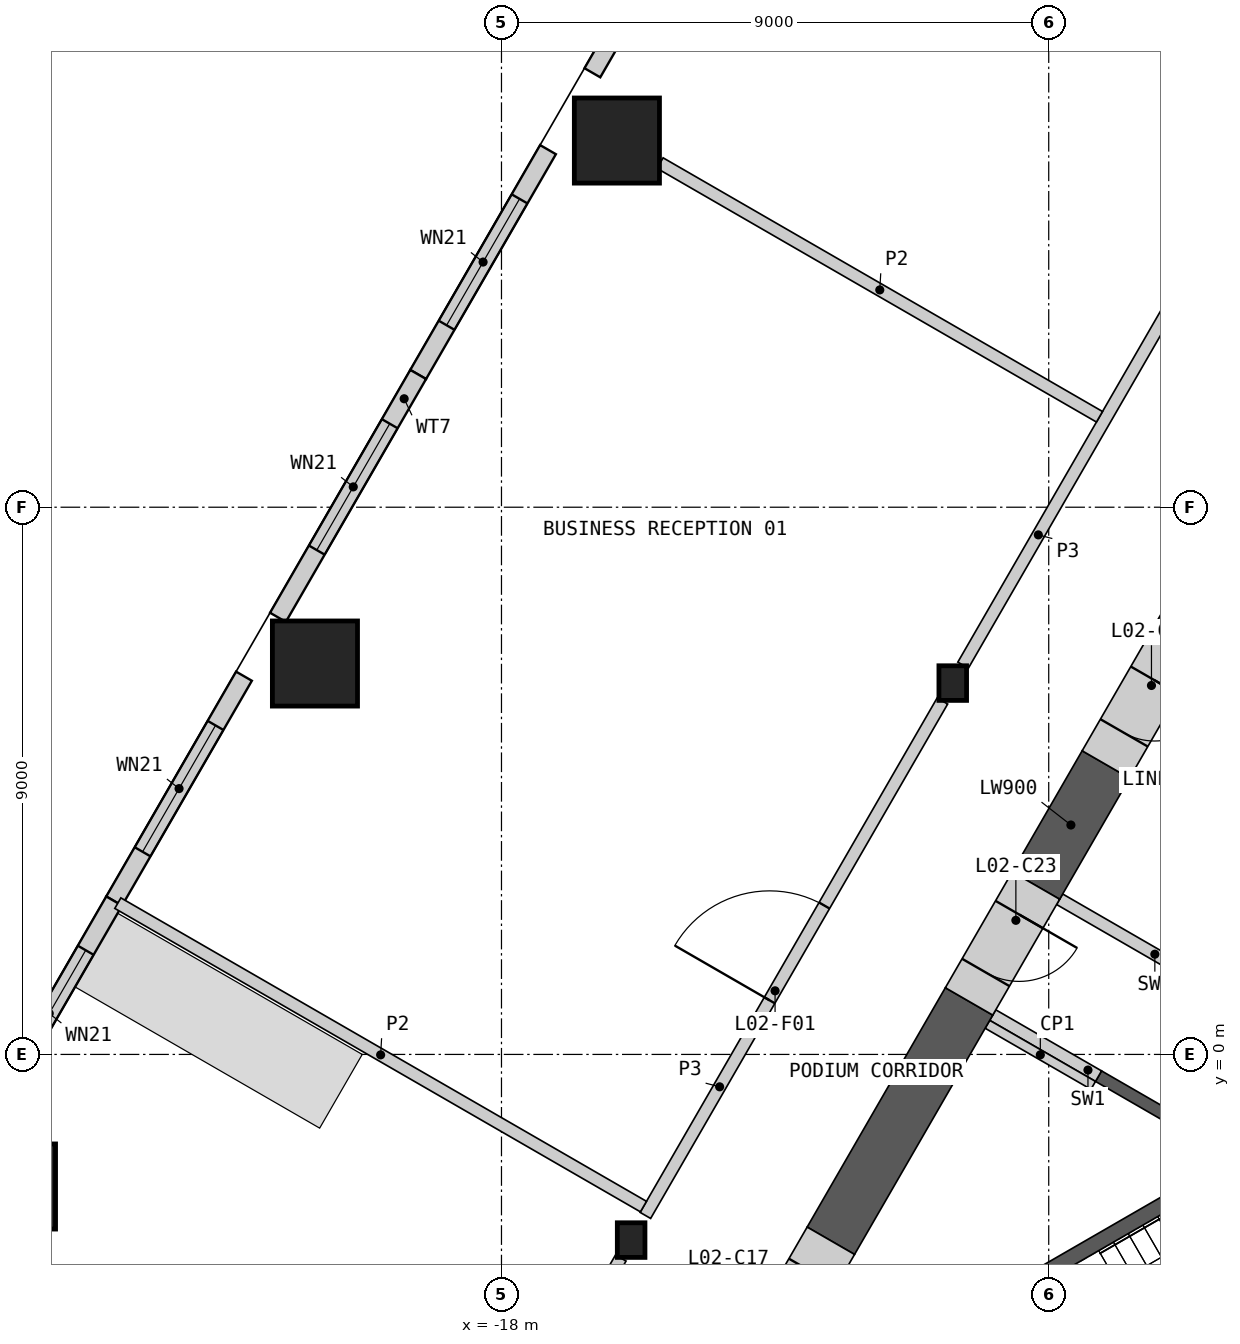
"""IFC4 building model, lengths in metres.
Left out: names, types, materials, properties, quantities, classifications, styles, units other than length and angle.
Written with IfcOpenShell. Run it as: python <this file> out.ifc"""

import sys

from ifc_helpers import new_model, si_unit, direction, frame, frame_2d, origin, origin_2d, place, context, subcontext, project, spatial, polyline, rectangle, hollow_rectangle, i_section, outline, extrude, element, fill, save


model = new_model("IFC4")
c1 = context("Model", 3, precision=1e-05, world=origin(), true_north=direction((0.0, 1.0)))
c2 = subcontext(c1, "Body", "Model", "MODEL_VIEW")
j1 = project(units=[si_unit("LENGTHUNIT", "METRE"), si_unit("PLANEANGLEUNIT", "RADIAN")], contexts=[c1])
p1 = place(None, origin())
s1 = spatial("IfcSite", under=j1, at=p1, CompositionType="ELEMENT")
p2 = place(p1, origin())
s2 = spatial("IfcBuilding", under=s1, at=p2, CompositionType="ELEMENT")
p3 = place(p2, frame((0.0, 0.0, 15.5)))
s3 = spatial("IfcBuildingStorey", under=s2, at=p3, CompositionType="ELEMENT", Elevation=15.5)
for number, where, z_axis, x_axis in (
    (1, (-16.102, 15.031, 0.0), (0.0, 0.0, 1.0), (1.0, 0.0, 0.0)),
    (2, (-21.068, 6.429, 0.0), (0.0, 0.0, 1.0), (1.0, 0.0, 0.0)),
    (3, (-26.034, -2.172, 0.0), (0.0, 0.0, 1.0), (1.0, 0.0, 0.0)),
):
    element("IfcColumn", number, at=place(p3, frame(where, z_axis=z_axis, x_axis=x_axis)), inside=s3, PredefinedType="COLUMN", context=c2, shape_type="SweptSolid", body=[
        extrude(hollow_rectangle(XDim=1.4, YDim=1.4, WallThickness=0.1, at=origin_2d()), origin(), (0.0, 0.0, 1.0), 5.5),
    ])
for number, where, z_axis, x_axis in (
    (4, (-10.578, 6.107, 0.0), (0.0, 0.0, 1.0), (1.0, 0.0, 0.0)),
    (5, (-15.868, -3.054, 0.0), (0.0, 0.0, 1.0), (1.0, 0.0, 0.0)),
):
    element("IfcColumn", number, at=place(p3, frame(where, z_axis=z_axis, x_axis=x_axis)), inside=s3, PredefinedType="COLUMN", context=c2, shape_type="SweptSolid", body=[
        extrude(i_section(OverallWidth=0.454, OverallDepth=0.57, WebThickness=0.078, FlangeThickness=0.125, at=origin_2d()), origin(), (0.0, 0.0, 1.0), 5.5),
    ])
p4 = place(p3, frame((-14.37, 19.844, 0.0), z_axis=(0.0, 0.0, 1.0), x_axis=(-0.500019418418, -0.866014192265, 0.0)))
e6 = element("IfcWall", 6, at=p4, inside=s3, PredefinedType="SOLIDWALL", context=c2, shape_type="SweptSolid", body=[
    extrude(rectangle(XDim=4.27, YDim=0.3, at=frame_2d((2.135, 0.0))), origin(), (0.0, 0.0, 1.0), 5.05),
])
p5 = place(p4, frame((0.935, 0.0, 0.9)))
e7 = element("IfcOpeningElement", 7, at=p5, cuts=e6, PredefinedType="OPENING", context=c2, shape_type="SweptSolid", body=[
    extrude(rectangle(XDim=2.4, YDim=3.0, at=frame_2d((1.2, 1.5))), frame((0.0, 0.16, 0.0), z_axis=(0.0, -1.0, 0.0), x_axis=(1.0, 0.0, 0.0)), (0.0, 0.0, 1.0), 0.32),
])
p6 = place(p3, frame((-17.235, 14.881, 0.0), z_axis=(0.0, 0.0, 1.0), x_axis=(-0.499994660107, -0.866028486751, 0.0)))
e8 = element("IfcWall", 8, at=p6, inside=s3, PredefinedType="SOLIDWALL", context=c2, shape_type="SweptSolid", body=[
    extrude(rectangle(XDim=4.27, YDim=0.3, at=frame_2d((2.135, 0.0))), origin(), (0.0, 0.0, 1.0), 5.05),
])
p7 = place(p6, frame((0.935, 0.0, 0.9)))
e9 = element("IfcOpeningElement", 9, at=p7, cuts=e8, PredefinedType="OPENING", context=c2, shape_type="SweptSolid", body=[
    extrude(rectangle(XDim=2.4, YDim=3.0, at=frame_2d((1.2, 1.5))), frame((0.0, 0.16, 0.0), z_axis=(0.0, -1.0, 0.0), x_axis=(1.0, 0.0, 0.0)), (0.0, 0.0, 1.0), 0.32),
])
p8 = place(p3, frame((-19.37, 11.183, 0.0), z_axis=(0.0, 0.0, 1.0), x_axis=(-0.499982117899, -0.866035727774, 0.0)))
e10 = element("IfcWall", 10, at=p8, inside=s3, PredefinedType="SOLIDWALL", context=c2, shape_type="SweptSolid", body=[
    extrude(rectangle(XDim=4.612, YDim=0.3, at=frame_2d((2.306, 0.0))), origin(), (0.0, 0.0, 1.0), 5.05),
])
p9 = place(p8, frame((0.935, 0.0, 0.9)))
e11 = element("IfcOpeningElement", 11, at=p9, cuts=e10, PredefinedType="OPENING", context=c2, shape_type="SweptSolid", body=[
    extrude(rectangle(XDim=2.4, YDim=3.0, at=frame_2d((1.2, 1.5))), frame((0.0, 0.16, 0.0), z_axis=(0.0, -1.0, 0.0), x_axis=(1.0, 0.0, 0.0)), (0.0, 0.0, 1.0), 0.32),
])
p10 = place(p3, frame((-22.235, 6.221, 0.0), z_axis=(0.0, 0.0, 1.0), x_axis=(-0.500019418418, -0.866014192265, 0.0)))
e12 = element("IfcWall", 12, at=p10, inside=s3, PredefinedType="SOLIDWALL", context=c2, shape_type="SweptSolid", body=[
    extrude(rectangle(XDim=4.27, YDim=0.3, at=frame_2d((2.135, 0.0))), origin(), (0.0, 0.0, 1.0), 5.05),
])
p11 = place(p10, frame((0.935, 0.0, 0.9)))
e13 = element("IfcOpeningElement", 13, at=p11, cuts=e12, PredefinedType="OPENING", context=c2, shape_type="SweptSolid", body=[
    extrude(rectangle(XDim=2.4, YDim=3.0, at=frame_2d((1.2, 1.5))), frame((0.0, 0.16, 0.0), z_axis=(0.0, -1.0, 0.0), x_axis=(1.0, 0.0, 0.0)), (0.0, 0.0, 1.0), 0.32),
])
p12 = place(p3, frame((-24.37, 2.523, 0.0), z_axis=(0.0, 0.0, 1.0), x_axis=(-0.499964285679, -0.866046022475, 0.0)))
e14 = element("IfcWall", 14, at=p12, inside=s3, PredefinedType="SOLIDWALL", context=c2, shape_type="SweptSolid", body=[
    extrude(rectangle(XDim=4.544, YDim=0.3, at=frame_2d((2.272, 0.0))), origin(), (0.0, 0.0, 1.0), 5.05),
])
p13 = place(p12, frame((0.935, 0.0, 0.9)))
e15 = element("IfcOpeningElement", 15, at=p13, cuts=e14, PredefinedType="OPENING", context=c2, shape_type="SweptSolid", body=[
    extrude(rectangle(XDim=2.4, YDim=3.0, at=frame_2d((1.2, 1.5))), frame((0.0, 0.16, 0.0), z_axis=(0.0, -1.0, 0.0), x_axis=(1.0, 0.0, 0.0)), (0.0, 0.0, 1.0), 0.32),
])
p14 = place(p3, origin())
e16 = element("IfcWall", 16, at=p14, inside=s3, PredefinedType="SHEAR", context=c2, shape_type="SweptSolid", body=[
    extrude(outline(polyline([(-6.061, -1.697), (-8.231, -0.444), (-8.131, -0.271), (-5.96, -1.524), (-6.061, -1.697)])), origin(), (0.0, 0.0, 1.0), 5.05),
])
p15 = place(p3, frame((-7.081, 1.548, 0.0), z_axis=(0.0, 0.0, 1.0), x_axis=(-0.865983199114, 0.50007309351, 0.0)))
e17 = element("IfcWall", 17, at=p15, inside=s3, PredefinedType="SHEAR", context=c2, shape_type="SweptSolid", body=[
    extrude(rectangle(XDim=2.009, YDim=0.2, at=frame_2d((1.004, 0.0))), origin(), (0.0, 0.0, 1.0), 5.05),
])
p16 = place(p3, frame((-8.181, -0.357, 0.0), z_axis=(0.0, 0.0, 1.0), x_axis=(-0.866035824272, 0.499981950752, 0.0)))
e18 = element("IfcWall", 18, at=p16, inside=s3, PredefinedType="SHEAR", context=c2, shape_type="SweptSolid", body=[
    extrude(rectangle(XDim=2.009, YDim=0.2, at=frame_2d((1.004, 0.0))), origin(), (0.0, 0.0, 1.0), 5.05),
])
p17 = place(p3, origin())
e19 = element("IfcWall", 19, at=p17, inside=s3, PredefinedType="SHEAR", context=c2, shape_type="SweptSolid", body=[
    extrude(outline(polyline([(-5.307, -1.281), (-10.374, -4.206), (-10.032, -4.298), (-5.182, -1.498), (-5.307, -1.281)])), origin(), (0.0, 0.0, 1.0), 5.05),
])
p18 = place(p3, frame((-8.268, -0.509, 0.0), z_axis=(0.0, 0.0, 1.0), x_axis=(-0.866035824272, 0.499981950752, 0.0)))
e20 = element("IfcWall", 20, at=p18, inside=s3, PredefinedType="PARTITIONING", context=c2, shape_type="SweptSolid", body=[
    extrude(rectangle(XDim=2.009, YDim=0.15, at=frame_2d((1.004, 0.0))), origin(), (0.0, 0.0, 1.0), 5.05),
])
p19 = place(p3, frame((-10.31, 0.872, 0.0), z_axis=(0.0, 0.0, 1.0), x_axis=(-0.499968858743, -0.866043382451, 0.0)))
e21 = element("IfcWall", 21, at=p19, inside=s3, PredefinedType="SHEAR", context=c2, shape_type="SweptSolid", body=[
    extrude(rectangle(XDim=4.546, YDim=0.9, at=frame_2d((2.273, 0.0))), origin(), (0.0, 0.0, 1.0), 5.05),
])
p20 = place(p3, frame((-5.545, 9.126, 0.0), z_axis=(0.0, 0.0, 1.0), x_axis=(-0.499978737809, -0.866037679168, 0.0)))
e22 = element("IfcWall", 22, at=p20, inside=s3, PredefinedType="SHEAR", context=c2, shape_type="SweptSolid", body=[
    extrude(rectangle(XDim=2.831, YDim=0.9, at=frame_2d((1.416, 0.0))), origin(), (0.0, 0.0, 1.0), 5.05),
])
p21 = place(p3, frame((-8.06, 4.769, 0.0), z_axis=(0.0, 0.0, 1.0), x_axis=(-0.499952165731, -0.866053019151, 0.0)))
e23 = element("IfcWall", 23, at=p21, inside=s3, PredefinedType="SHEAR", context=c2, shape_type="SweptSolid", body=[
    extrude(rectangle(XDim=2.3, YDim=0.9, at=frame_2d((1.15, 0.0))), origin(), (0.0, 0.0, 1.0), 5.05),
])
p22 = place(p3, frame((-12.583, -3.065, 0.0), z_axis=(0.0, 0.0, 1.0), x_axis=(-0.50002983664, -0.866008176907, 0.0)))
e24 = element("IfcWall", 24, at=p22, inside=s3, PredefinedType="SHEAR", context=c2, shape_type="SweptSolid", body=[
    extrude(rectangle(XDim=2.2, YDim=0.9, at=frame_2d((1.1, 0.0))), origin(), (0.0, 0.0, 1.0), 5.05),
])
p23 = place(p22, frame((0.6, 0.0, 0.0)))
e25 = element("IfcOpeningElement", 25, at=p23, cuts=e24, PredefinedType="OPENING", context=c2, shape_type="SweptSolid", body=[
    extrude(rectangle(XDim=1.0, YDim=2.1, at=frame_2d((0.5, 1.05))), frame((0.0, 0.46, 0.0), z_axis=(0.0, -1.0, 0.0), x_axis=(1.0, 0.0, 0.0)), (0.0, 0.0, 1.0), 0.92),
])
p24 = place(p3, frame((-6.96, 6.674, 0.0), z_axis=(0.0, 0.0, 1.0), x_axis=(-0.50002983664, -0.866008176907, 0.0)))
e26 = element("IfcWall", 26, at=p24, inside=s3, PredefinedType="SHEAR", context=c2, shape_type="SweptSolid", body=[
    extrude(rectangle(XDim=2.2, YDim=0.9, at=frame_2d((1.1, 0.0))), origin(), (0.0, 0.0, 1.0), 5.05),
])
p25 = place(p24, frame((0.6, 0.0, 0.0)))
e27 = element("IfcOpeningElement", 27, at=p25, cuts=e26, PredefinedType="OPENING", context=c2, shape_type="SweptSolid", body=[
    extrude(rectangle(XDim=1.0, YDim=2.1, at=frame_2d((0.5, 1.05))), frame((0.0, 0.46, 0.0), z_axis=(0.0, -1.0, 0.0), x_axis=(1.0, 0.0, 0.0)), (0.0, 0.0, 1.0), 0.92),
])
p26 = place(p3, frame((-9.21, 2.777, 0.0), z_axis=(0.0, 0.0, 1.0), x_axis=(-0.500077893725, -0.86598042715, 0.0)))
e28 = element("IfcWall", 28, at=p26, inside=s3, PredefinedType="SHEAR", context=c2, shape_type="SweptSolid", body=[
    extrude(rectangle(XDim=2.2, YDim=0.9, at=frame_2d((1.1, 0.0))), origin(), (0.0, 0.0, 1.0), 5.05),
])
p27 = place(p26, frame((0.55, 0.0, 0.0)))
e29 = element("IfcOpeningElement", 29, at=p27, cuts=e28, PredefinedType="OPENING", context=c2, shape_type="SweptSolid", body=[
    extrude(rectangle(XDim=1.1, YDim=2.1, at=frame_2d((0.55, 1.05))), frame((0.0, 0.46, 0.0), z_axis=(0.0, -1.0, 0.0), x_axis=(1.0, 0.0, 0.0)), (0.0, 0.0, 1.0), 0.92),
])
p28 = place(p3, frame((-10.408, 6.402, 0.0), z_axis=(0.0, 0.0, 1.0), x_axis=(0.499985793049, 0.866033606016, 0.0)))
e30 = element("IfcWall", 30, at=p28, inside=s3, PredefinedType="PARTITIONING", context=c2, shape_type="SweptSolid", body=[
    extrude(rectangle(XDim=9.898, YDim=0.2, at=frame_2d((4.949, 0.0))), origin(), (0.0, 0.0, 1.0), 5.05),
])
p29 = place(p3, frame((-15.634, -2.648, 0.0), z_axis=(0.0, 0.0, 1.0), x_axis=(0.500017363087, 0.866015378969, 0.0)))
e31 = element("IfcWall", 31, at=p29, inside=s3, PredefinedType="PARTITIONING", context=c2, shape_type="SweptSolid", body=[
    extrude(rectangle(XDim=9.77, YDim=0.2, at=frame_2d((4.885, 0.0))), origin(), (0.0, 0.0, 1.0), 5.05),
])
p30 = place(p29, frame((4.086, 0.0, 0.0)))
e32 = element("IfcOpeningElement", 32, at=p30, cuts=e31, PredefinedType="OPENING", context=c2, shape_type="SweptSolid", body=[
    extrude(rectangle(XDim=1.8, YDim=2.1, at=frame_2d((0.9, 1.05))), frame((0.0, 0.11, 0.0), z_axis=(0.0, -1.0, 0.0), x_axis=(1.0, 0.0, 0.0)), (0.0, 0.0, 1.0), 0.22),
])
p31 = place(p3, frame((-19.244, -8.902, 0.0), z_axis=(0.0, 0.0, 1.0), x_axis=(0.499988314375, 0.866032150378, 0.0)))
e33 = element("IfcWall", 33, at=p31, inside=s3, PredefinedType="PARTITIONING", context=c2, shape_type="SweptSolid", body=[
    extrude(rectangle(XDim=6.412, YDim=0.2, at=frame_2d((3.206, 0.0))), origin(), (0.0, 0.0, 1.0), 5.05),
])
p32 = place(p31, frame((2.756, 0.0, 0.0)))
e34 = element("IfcOpeningElement", 34, at=p32, cuts=e33, PredefinedType="OPENING", context=c2, shape_type="SweptSolid", body=[
    extrude(rectangle(XDim=1.0, YDim=2.1, at=frame_2d((0.5, 1.05))), frame((0.0, 0.11, 0.0), z_axis=(0.0, -1.0, 0.0), x_axis=(1.0, 0.0, 0.0)), (0.0, 0.0, 1.0), 0.22),
])
p33 = place(p3, frame((-24.31, 2.488, 0.0), z_axis=(0.0, 0.0, 1.0), x_axis=(0.866034070548, -0.499984988425, 0.0)))
e35 = element("IfcWall", 35, at=p33, inside=s3, PredefinedType="PARTITIONING", context=c2, shape_type="SweptSolid", body=[
    extrude(rectangle(XDim=9.982, YDim=0.2, at=frame_2d((4.991, 0.0))), origin(), (0.0, 0.0, 1.0), 5.05),
])
p34 = place(p3, frame((-15.392, 14.66, 0.0), z_axis=(0.0, 0.0, 1.0), x_axis=(0.866027244746, -0.499996811348, 0.0)))
e36 = element("IfcWall", 36, at=p34, inside=s3, PredefinedType="PARTITIONING", context=c2, shape_type="SweptSolid", body=[
    extrude(rectangle(XDim=8.345, YDim=0.2, at=frame_2d((4.172, 0.0))), origin(), (0.0, 0.0, 1.0), 5.05),
])
p35 = place(p7, origin())
e37 = element("IfcWindow", 37, at=p35, inside=s3, PartitioningType="SINGLE_PANEL", PredefinedType="WINDOW", context=c2, shape_type="SweptSolid", body=[
    extrude(rectangle(XDim=2.4, YDim=3.0, at=frame_2d((1.2, 1.5))), frame((0.0, 0.03, 0.0), z_axis=(0.0, -1.0, 0.0), x_axis=(1.0, 0.0, 0.0)), (0.0, 0.0, 1.0), 0.06),
])
fill(e9, e37)
p36 = place(p9, origin())
e38 = element("IfcWindow", 38, at=p36, inside=s3, PartitioningType="SINGLE_PANEL", PredefinedType="WINDOW", context=c2, shape_type="SweptSolid", body=[
    extrude(rectangle(XDim=2.4, YDim=3.0, at=frame_2d((1.2, 1.5))), frame((0.0, 0.03, 0.0), z_axis=(0.0, -1.0, 0.0), x_axis=(1.0, 0.0, 0.0)), (0.0, 0.0, 1.0), 0.06),
])
fill(e11, e38)
p37 = place(p11, origin())
e39 = element("IfcWindow", 39, at=p37, inside=s3, PartitioningType="SINGLE_PANEL", PredefinedType="WINDOW", context=c2, shape_type="SweptSolid", body=[
    extrude(rectangle(XDim=2.4, YDim=3.0, at=frame_2d((1.2, 1.5))), frame((0.0, 0.03, 0.0), z_axis=(0.0, -1.0, 0.0), x_axis=(1.0, 0.0, 0.0)), (0.0, 0.0, 1.0), 0.06),
])
fill(e13, e39)
p38 = place(p13, origin())
e40 = element("IfcWindow", 40, at=p38, inside=s3, PartitioningType="SINGLE_PANEL", PredefinedType="WINDOW", context=c2, shape_type="SweptSolid", body=[
    extrude(rectangle(XDim=2.4, YDim=3.0, at=frame_2d((1.2, 1.5))), frame((0.0, 0.03, 0.0), z_axis=(0.0, -1.0, 0.0), x_axis=(1.0, 0.0, 0.0)), (0.0, 0.0, 1.0), 0.06),
])
fill(e15, e40)
p39 = place(p25, origin())
e41 = element("IfcDoor", 41, at=p39, inside=s3, OperationType="SINGLE_SWING_LEFT", PredefinedType="DOOR", context=c2, shape_type="SweptSolid", body=[
    extrude(rectangle(XDim=1.0, YDim=2.1, at=frame_2d((0.5, 1.05))), frame((0.0, 0.205, 0.0), z_axis=(0.0, -1.0, 0.0), x_axis=(1.0, 0.0, 0.0)), (0.0, 0.0, 1.0), 0.05),
])
fill(e27, e41)
p40 = place(p27, origin())
e42 = element("IfcDoor", 42, at=p40, inside=s3, OperationType="SINGLE_SWING_LEFT", PredefinedType="DOOR", context=c2, shape_type="SweptSolid", body=[
    extrude(rectangle(XDim=1.1, YDim=2.1, at=frame_2d((0.55, 1.05))), frame((0.0, 0.205, 0.0), z_axis=(0.0, -1.0, 0.0), x_axis=(1.0, 0.0, 0.0)), (0.0, 0.0, 1.0), 0.05),
])
fill(e29, e42)
p41 = place(p30, origin())
e43 = element("IfcDoor", 43, at=p41, inside=s3, OperationType="DOUBLE_DOOR_SINGLE_SWING", PredefinedType="DOOR", context=c2, shape_type="SweptSolid", body=[
    extrude(rectangle(XDim=1.8, YDim=2.1, at=frame_2d((0.9, 1.05))), frame((0.0, 0.025, 0.0), z_axis=(0.0, -1.0, 0.0), x_axis=(1.0, 0.0, 0.0)), (0.0, 0.0, 1.0), 0.05),
])
fill(e32, e43)
save(model, sys.argv[1])
